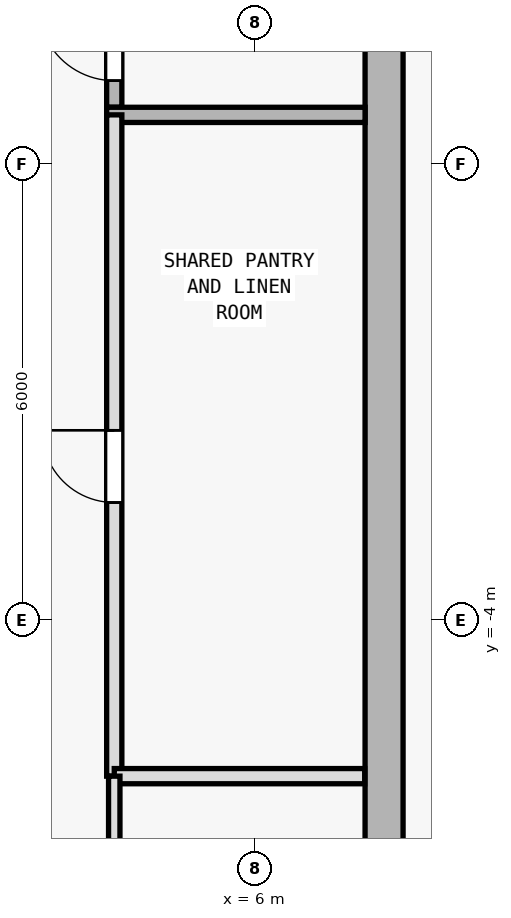
"""IFC4 building model, lengths in metres.
Left out: names, types, materials, properties, quantities, classifications, styles, units other than length and angle.
Written with IfcOpenShell. Run it as: python <this file> out.ifc"""

import sys

from ifc_helpers import new_model, si_unit, direction, frame, frame_2d, origin, origin_2d, place, context, subcontext, project, spatial, rectangle, i_section, extrude, element, fill, save


model = new_model("IFC4")
c1 = context("Model", 3, precision=1e-05, world=origin(), true_north=direction((0.0, 1.0)))
c2 = subcontext(c1, "Body", "Model", "MODEL_VIEW")
j1 = project(units=[si_unit("LENGTHUNIT", "METRE"), si_unit("PLANEANGLEUNIT", "RADIAN")], contexts=[c1])
p1 = place(None, origin())
s1 = spatial("IfcSite", under=j1, at=p1, CompositionType="ELEMENT")
p2 = place(p1, origin())
s2 = spatial("IfcBuilding", under=s1, at=p2, CompositionType="ELEMENT")
p3 = place(p2, frame((0.0, 0.0, 153.0)))
s3 = spatial("IfcBuildingStorey", under=s2, at=p3, CompositionType="ELEMENT", Elevation=153.0)
p4 = place(p3, frame((7.7, 0.4, 0.0), z_axis=(0.0, 0.0, 1.0), x_axis=(1.0, 0.0, 0.0)))
e1 = element("IfcColumn", 1, at=p4, inside=s3, PredefinedType="COLUMN", context=c2, shape_type="SweptSolid", body=[
    extrude(i_section(OverallWidth=0.404, OverallDepth=0.407, WebThickness=0.017, FlangeThickness=0.028, FilletRadius=0.015, at=origin_2d()), origin(), (0.0, 0.0, 1.0), 3.6),
])
p5 = place(p3, frame((7.7, 9.95, 0.0), z_axis=(0.0, 0.0, 1.0), x_axis=(0.0, -1.0, 0.0)))
e2 = element("IfcWall", 2, at=p5, inside=s3, PredefinedType="SHEAR", context=c2, shape_type="SweptSolid", body=[
    extrude(rectangle(XDim=19.1, YDim=0.5, at=frame_2d((9.55, 0.0))), origin(), (0.0, 0.0, 1.0), 3.35),
])
p6 = place(p3, frame((4.15, 2.75, 0.0), z_axis=(0.0, 0.0, 1.0), x_axis=(0.0, 1.0, 0.0)))
e3 = element("IfcWall", 3, at=p6, inside=s3, PredefinedType="SOLIDWALL", context=c2, shape_type="SweptSolid", body=[
    extrude(rectangle(XDim=7.2, YDim=0.2, at=frame_2d((3.6, 0.0))), origin(), (0.0, 0.0, 1.0), 3.35),
])
p7 = place(p6, frame((0.35, 0.0, 0.0)))
e4 = element("IfcOpeningElement", 4, at=p7, cuts=e3, PredefinedType="OPENING", context=c2, shape_type="SweptSolid", body=[
    extrude(rectangle(XDim=1.0, YDim=2.15, at=frame_2d((0.5, 1.075))), frame((0.0, 0.11, 0.0), z_axis=(0.0, -1.0, 0.0), x_axis=(1.0, 0.0, 0.0)), (0.0, 0.0, 1.0), 0.22),
])
p8 = place(p3, frame((4.05, 2.65, 0.0), z_axis=(0.0, 0.0, 1.0), x_axis=(1.0, 0.0, 0.0)))
e5 = element("IfcWall", 5, at=p8, inside=s3, PredefinedType="SOLIDWALL", context=c2, shape_type="SweptSolid", body=[
    extrude(rectangle(XDim=3.4, YDim=0.2, at=frame_2d((1.7, 0.0))), origin(), (0.0, 0.0, 1.0), 3.35),
])
p9 = place(p3, frame((4.15, -6.05, 0.0), z_axis=(0.0, 0.0, 1.0), x_axis=(0.0, 1.0, 0.0)))
e6 = element("IfcWall", 6, at=p9, inside=s3, PredefinedType="SOLIDWALL", context=c2, shape_type="SweptSolid", body=[
    extrude(rectangle(XDim=8.7, YDim=0.2, at=frame_2d((4.35, 0.0))), origin(), (0.0, 0.0, 1.0), 3.35),
])
p10 = place(p9, frame((3.6, 0.0, 0.0)))
e7 = element("IfcOpeningElement", 7, at=p10, cuts=e6, PredefinedType="OPENING", context=c2, shape_type="SweptSolid", body=[
    extrude(rectangle(XDim=0.95, YDim=2.1, at=frame_2d((0.475, 1.05))), frame((0.0, 0.11, 0.0), z_axis=(0.0, -1.0, 0.0), x_axis=(1.0, 0.0, 0.0)), (0.0, 0.0, 1.0), 0.22),
])
p11 = place(p3, frame((4.15, -6.05, 0.0), z_axis=(0.0, 0.0, 1.0), x_axis=(1.0, 0.0, 0.0)))
e8 = element("IfcWall", 8, at=p11, inside=s3, PredefinedType="SOLIDWALL", context=c2, shape_type="SweptSolid", body=[
    extrude(rectangle(XDim=3.295, YDim=0.2, at=frame_2d((1.647, 0.0))), origin(), (0.0, 0.0, 1.0), 3.35),
])
p12 = place(p3, frame((4.15, -9.145, 0.0), z_axis=(0.0, 0.0, 1.0), x_axis=(0.0, 1.0, 0.0)))
e9 = element("IfcWall", 9, at=p12, inside=s3, PredefinedType="PARTITIONING", context=c2, shape_type="SweptSolid", body=[
    extrude(rectangle(XDim=3.095, YDim=0.15, at=frame_2d((1.547, 0.0))), origin(), (0.0, 0.0, 1.0), 3.35),
])
p13 = place(p12, frame((0.845, 0.0, 0.0)))
e10 = element("IfcOpeningElement", 10, at=p13, cuts=e9, PredefinedType="OPENING", context=c2, shape_type="SweptSolid", body=[
    extrude(rectangle(XDim=0.9, YDim=2.1, at=frame_2d((0.45, 1.05))), frame((0.0, 0.085, 0.0), z_axis=(0.0, -1.0, 0.0), x_axis=(1.0, 0.0, 0.0)), (0.0, 0.0, 1.0), 0.17),
])
p14 = place(p7, origin())
e11 = element("IfcDoor", 11, at=p14, inside=s3, OperationType="SINGLE_SWING_RIGHT", PredefinedType="DOOR", context=c2, shape_type="SweptSolid", body=[
    extrude(rectangle(XDim=1.0, YDim=2.15, at=frame_2d((0.5, 1.075))), frame((0.0, 0.025, 0.0), z_axis=(0.0, -1.0, 0.0), x_axis=(1.0, 0.0, 0.0)), (0.0, 0.0, 1.0), 0.05),
])
fill(e4, e11)
p15 = place(p10, origin())
e12 = element("IfcDoor", 12, at=p15, inside=s3, OperationType="SINGLE_SWING_RIGHT", PredefinedType="DOOR", context=c2, shape_type="SweptSolid", body=[
    extrude(rectangle(XDim=0.95, YDim=2.1, at=frame_2d((0.475, 1.05))), frame((0.0, 0.025, 0.0), z_axis=(0.0, -1.0, 0.0), x_axis=(1.0, 0.0, 0.0)), (0.0, 0.0, 1.0), 0.05),
])
fill(e7, e12)
save(model, sys.argv[1])
